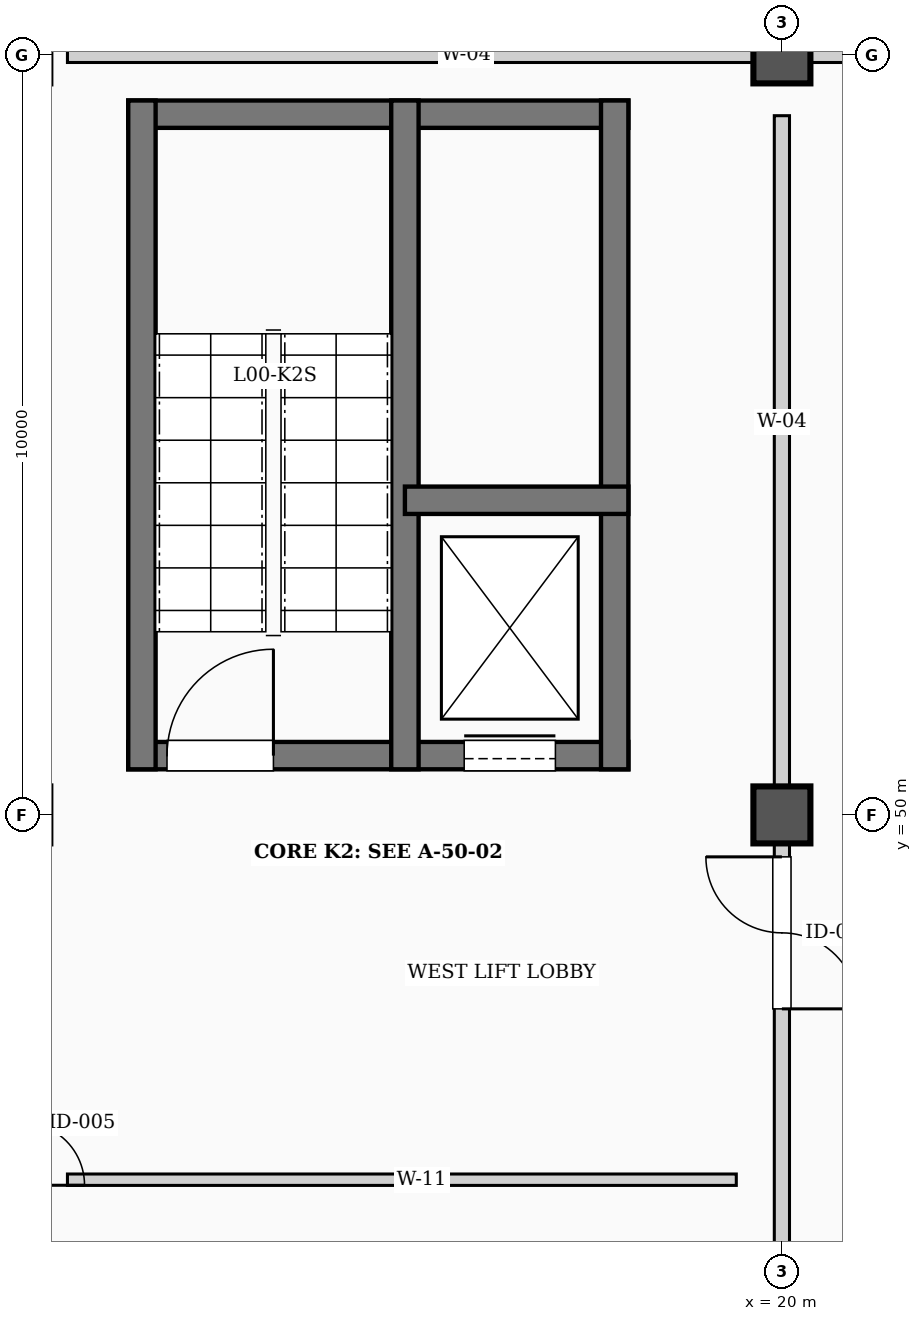
"""IFC4 building model, lengths in metres.
Left out: names, types, materials, properties, quantities, classifications, styles, units other than length and angle.
Written with IfcOpenShell. Run it as: python <this file> out.ifc"""

import sys

from ifc_helpers import new_model, si_unit, direction, frame, frame_2d, origin, origin_2d, place, context, subcontext, project, spatial, rectangle, extrude, element, fill, save


model = new_model("IFC4")
c1 = context("Model", 3, precision=1e-05, world=origin(), true_north=direction((0.0, 1.0)))
c2 = subcontext(c1, "Body", "Model", "MODEL_VIEW")
j1 = project(units=[si_unit("LENGTHUNIT", "METRE"), si_unit("PLANEANGLEUNIT", "RADIAN")], contexts=[c1])
p1 = place(None, origin())
s1 = spatial("IfcSite", under=j1, at=p1, CompositionType="ELEMENT")
p2 = place(p1, origin())
s2 = spatial("IfcBuilding", under=s1, at=p2, CompositionType="ELEMENT")
p3 = place(p2, origin())
s3 = spatial("IfcBuildingStorey", under=s2, at=p3, CompositionType="ELEMENT", Elevation=0.0)
for number, where, z_axis, x_axis in (
    (1, (20.0, 50.0, 0.0), (0.0, 0.0, 1.0), (1.0, 0.0, 0.0)),
    (2, (20.0, 60.0, 0.0), (0.0, 0.0, 1.0), (1.0, 0.0, 0.0)),
):
    element("IfcColumn", number, at=place(p3, frame(where, z_axis=z_axis, x_axis=x_axis)), inside=s3, PredefinedType="COLUMN", context=c2, shape_type="SweptSolid", body=[
        extrude(rectangle(XDim=0.75, YDim=0.75, at=origin_2d()), origin(), (0.0, 0.0, 1.0), 5.4),
    ])
p4 = place(p3, frame((11.4, 50.78, 0.0), z_axis=(0.0, 0.0, 1.0), x_axis=(1.0, 0.0, 0.0)))
e3 = element("IfcWall", 3, at=p4, inside=s3, PredefinedType="SHEAR", context=c2, shape_type="SweptSolid", body=[
    extrude(rectangle(XDim=6.58, YDim=0.36, at=frame_2d((3.29, 0.0))), origin(), (0.0, 0.0, 1.0), 5.4),
])
p5 = place(p4, frame((0.51, 0.0, 0.0)))
e4 = element("IfcOpeningElement", 4, at=p5, cuts=e3, PredefinedType="OPENING", context=c2, shape_type="SweptSolid", body=[
    extrude(rectangle(XDim=1.4, YDim=2.35, at=frame_2d((0.7, 1.175))), frame((0.0, 0.19, 0.0), z_axis=(0.0, -1.0, 0.0), x_axis=(1.0, 0.0, 0.0)), (0.0, 0.0, 1.0), 0.38),
])
p6 = place(p4, frame((4.42, 0.0, 0.0)))
e5 = element("IfcOpeningElement", 5, at=p6, cuts=e3, PredefinedType="OPENING", context=c2, shape_type="SweptSolid", body=[
    extrude(rectangle(XDim=1.2, YDim=2.35, at=frame_2d((0.6, 1.175))), frame((0.0, 0.19, 0.0), z_axis=(0.0, -1.0, 0.0), x_axis=(1.0, 0.0, 0.0)), (0.0, 0.0, 1.0), 0.38),
])
p7 = place(p3, frame((11.4, 59.22, 0.0), z_axis=(0.0, 0.0, 1.0), x_axis=(1.0, 0.0, 0.0)))
e6 = element("IfcWall", 6, at=p7, inside=s3, PredefinedType="SHEAR", context=c2, shape_type="SweptSolid", body=[
    extrude(rectangle(XDim=6.58, YDim=0.36, at=frame_2d((3.29, 0.0))), origin(), (0.0, 0.0, 1.0), 5.4),
])
for number, where, z_axis, x_axis in (
    (7, (11.58, 50.6, 0.0), (0.0, 0.0, 1.0), (0.0, 1.0, 0.0)),
    (8, (17.8, 50.6, 0.0), (0.0, 0.0, 1.0), (0.0, 1.0, 0.0)),
    (9, (15.04, 50.6, 0.0), (0.0, 0.0, 1.0), (0.0, 1.0, 0.0)),
):
    element("IfcWall", number, at=place(p3, frame(where, z_axis=z_axis, x_axis=x_axis)), inside=s3, PredefinedType="SHEAR", context=c2, shape_type="SweptSolid", body=[
        extrude(rectangle(XDim=8.8, YDim=0.36, at=frame_2d((4.4, 0.0))), origin(), (0.0, 0.0, 1.0), 5.4),
    ])
p8 = place(p3, frame((15.04, 54.14, 0.0), z_axis=(0.0, 0.0, 1.0), x_axis=(1.0, 0.0, 0.0)))
e10 = element("IfcWall", 10, at=p8, inside=s3, PredefinedType="SHEAR", context=c2, shape_type="SweptSolid", body=[
    extrude(rectangle(XDim=2.94, YDim=0.36, at=frame_2d((1.47, 0.0))), origin(), (0.0, 0.0, 1.0), 5.4),
])
p9 = place(p3, frame((20.0, 20.8, 0.0), z_axis=(0.0, 0.0, 1.0), x_axis=(0.0, 1.0, 0.0)))
e11 = element("IfcWall", 11, at=p9, inside=s3, PredefinedType="PARTITIONING", context=c2, shape_type="SweptSolid", body=[
    extrude(rectangle(XDim=38.4, YDim=0.2, at=frame_2d((19.2, 0.0))), origin(), (0.0, 0.0, 1.0), 4.49),
])
p10 = place(p9, frame((10.72, 0.0, 0.0)))
e12 = element("IfcOpeningElement", 12, at=p10, cuts=e11, PredefinedType="OPENING", context=c2, shape_type="SweptSolid", body=[
    extrude(rectangle(XDim=1.6, YDim=2.4, at=frame_2d((0.8, 1.2))), frame((0.0, 0.11, 0.0), z_axis=(0.0, -1.0, 0.0), x_axis=(1.0, 0.0, 0.0)), (0.0, 0.0, 1.0), 0.22),
])
p11 = place(p9, frame((21.697, 0.0, 0.0)))
e13 = element("IfcOpeningElement", 13, at=p11, cuts=e11, PredefinedType="OPENING", context=c2, shape_type="SweptSolid", body=[
    extrude(rectangle(XDim=1.15, YDim=2.35, at=frame_2d((0.575, 1.175))), frame((0.0, 0.11, 0.0), z_axis=(0.0, -1.0, 0.0), x_axis=(1.0, 0.0, 0.0)), (0.0, 0.0, 1.0), 0.22),
])
p12 = place(p9, frame((26.648, 0.0, 0.0)))
e14 = element("IfcOpeningElement", 14, at=p12, cuts=e11, PredefinedType="OPENING", context=c2, shape_type="SweptSolid", body=[
    extrude(rectangle(XDim=2.0, YDim=2.45, at=frame_2d((1.0, 1.225))), frame((0.0, 0.11, 0.0), z_axis=(0.0, -1.0, 0.0), x_axis=(1.0, 0.0, 0.0)), (0.0, 0.0, 1.0), 0.22),
])
p13 = place(p3, frame((10.6, 45.2, 0.0), z_axis=(0.0, 0.0, 1.0), x_axis=(1.0, 0.0, 0.0)))
e15 = element("IfcWall", 15, at=p13, inside=s3, PredefinedType="PARTITIONING", context=c2, shape_type="SweptSolid", body=[
    extrude(rectangle(XDim=8.8, YDim=0.15, at=frame_2d((4.4, 0.0))), origin(), (0.0, 0.0, 1.0), 5.06),
])
p14 = place(p3, frame((10.6, 60.0, 0.0), z_axis=(0.0, 0.0, 1.0), x_axis=(1.0, 0.0, 0.0)))
e16 = element("IfcWall", 16, at=p14, inside=s3, PredefinedType="PARTITIONING", context=c2, shape_type="SweptSolid", body=[
    extrude(rectangle(XDim=18.6, YDim=0.2, at=frame_2d((9.3, 0.0))), origin(), (0.0, 0.0, 1.0), 4.59),
])
p15 = place(p14, frame((12.292, 0.0, 0.0)))
e17 = element("IfcOpeningElement", 17, at=p15, cuts=e16, PredefinedType="OPENING", context=c2, shape_type="SweptSolid", body=[
    extrude(rectangle(XDim=2.2, YDim=2.5, at=frame_2d((1.1, 1.25))), frame((0.0, 0.11, 0.0), z_axis=(0.0, -1.0, 0.0), x_axis=(1.0, 0.0, 0.0)), (0.0, 0.0, 1.0), 0.22),
])
p16 = place(p5, origin())
e18 = element("IfcDoor", 18, at=p16, inside=s3, OperationType="SINGLE_SWING_RIGHT", PredefinedType="DOOR", context=c2, shape_type="SweptSolid", body=[
    extrude(rectangle(XDim=1.4, YDim=2.35, at=frame_2d((0.7, 1.175))), frame((0.0, 0.025, 0.0), z_axis=(0.0, -1.0, 0.0), x_axis=(1.0, 0.0, 0.0)), (0.0, 0.0, 1.0), 0.05),
])
fill(e4, e18)
p17 = place(p6, origin())
e19 = element("IfcDoor", 19, at=p17, inside=s3, OperationType="SLIDING_TO_LEFT", PredefinedType="DOOR", context=c2, shape_type="SweptSolid", body=[
    extrude(rectangle(XDim=1.2, YDim=2.35, at=frame_2d((0.6, 1.175))), frame((0.0, 0.025, 0.0), z_axis=(0.0, -1.0, 0.0), x_axis=(1.0, 0.0, 0.0)), (0.0, 0.0, 1.0), 0.05),
])
fill(e5, e19)
p18 = place(p12, origin())
e20 = element("IfcDoor", 20, at=p18, inside=s3, OperationType="DOUBLE_DOOR_SINGLE_SWING", PredefinedType="DOOR", context=c2, shape_type="SweptSolid", body=[
    extrude(rectangle(XDim=2.0, YDim=2.45, at=frame_2d((1.0, 1.225))), frame((0.0, 0.025, 0.0), z_axis=(0.0, -1.0, 0.0), x_axis=(1.0, 0.0, 0.0)), (0.0, 0.0, 1.0), 0.05),
])
fill(e14, e20)
save(model, sys.argv[1])
